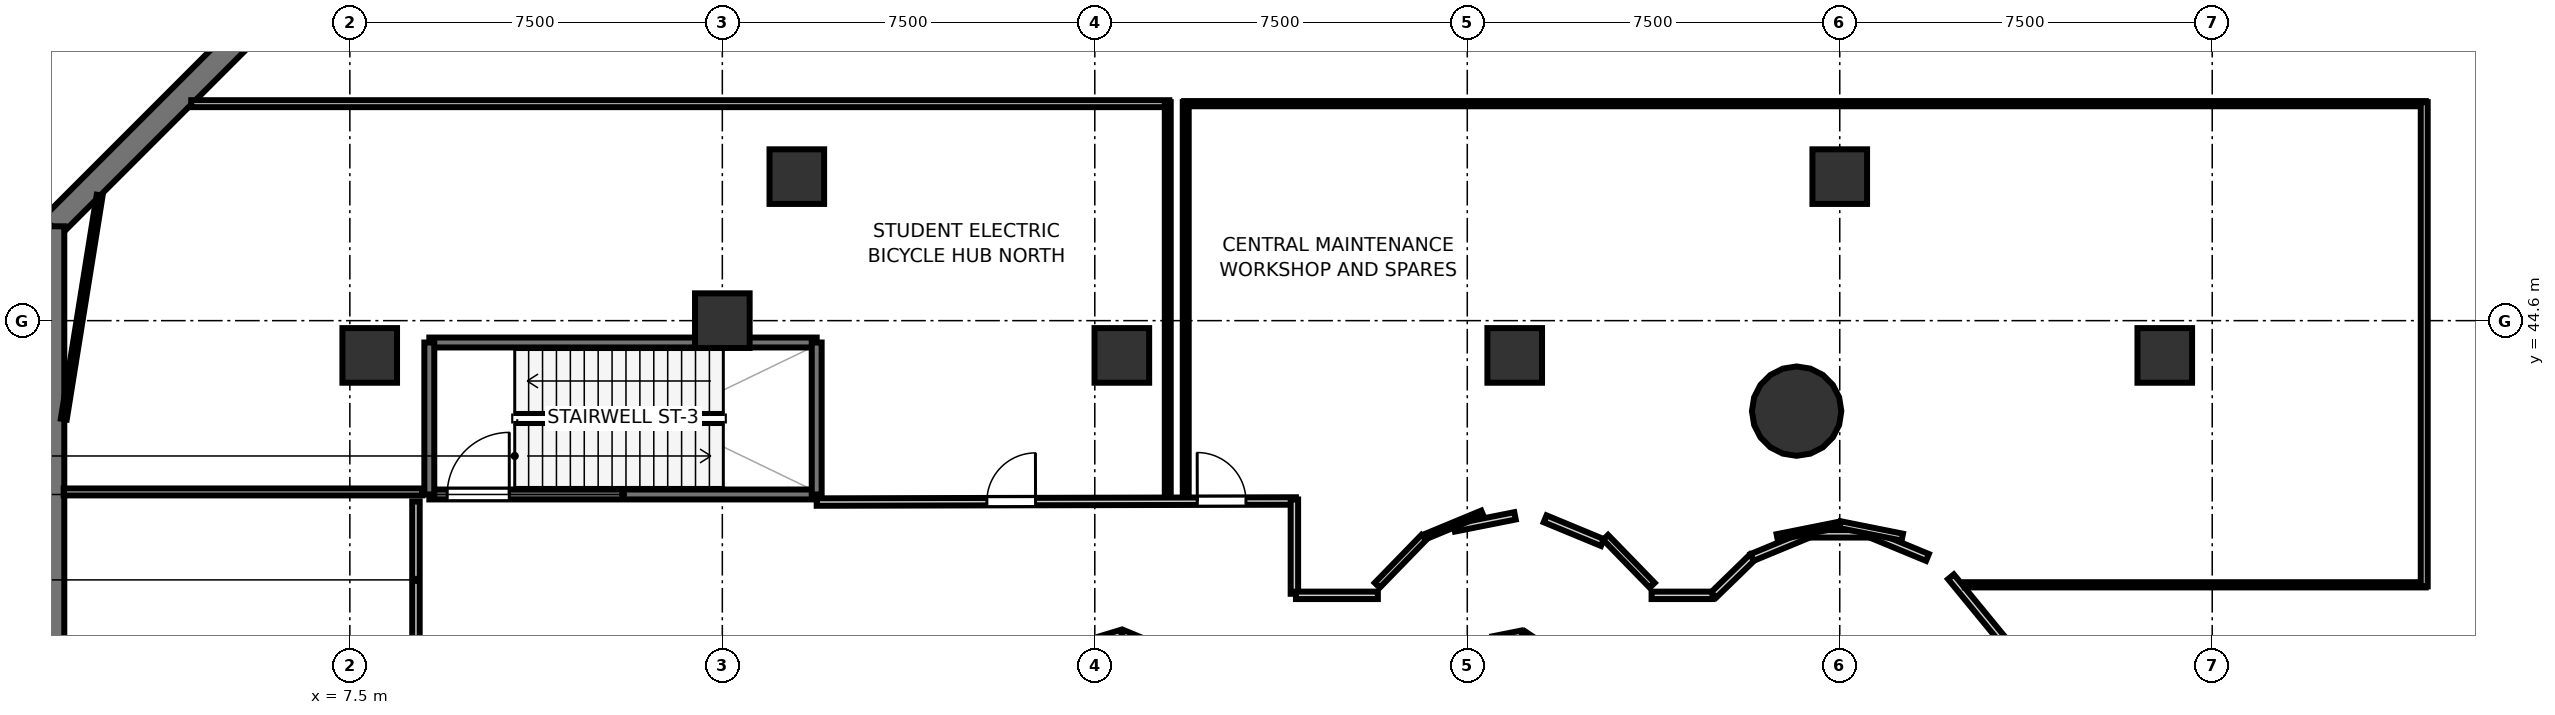
"""IFC4 building model, lengths in metres.
Left out: names, types, materials, properties, quantities, classifications, styles, units other than length and angle.
Written with IfcOpenShell. Run it as: python <this file> out.ifc"""

import sys

from ifc_helpers import new_model, si_unit, direction, frame, frame_2d, origin, origin_2d, place, context, subcontext, project, spatial, rectangle, hollow_circle, extrude, element, fill, save


model = new_model("IFC4")
c1 = context("Model", 3, precision=1e-05, world=origin(), true_north=direction((0.0, 1.0)))
c2 = subcontext(c1, "Body", "Model", "MODEL_VIEW")
j1 = project(units=[si_unit("LENGTHUNIT", "METRE"), si_unit("PLANEANGLEUNIT", "RADIAN")], contexts=[c1])
p1 = place(None, origin())
s1 = spatial("IfcSite", under=j1, at=p1, CompositionType="ELEMENT")
p2 = place(p1, origin())
s2 = spatial("IfcBuilding", under=s1, at=p2, CompositionType="ELEMENT")
p3 = place(p2, frame((0.0, 0.0, -5.6)))
s3 = spatial("IfcBuildingStorey", under=s2, at=p3, CompositionType="ELEMENT", Elevation=-5.6)
p4 = place(p3, frame((36.632, 42.778, 0.0), z_axis=(0.0, 0.0, 1.0), x_axis=(1.0, 0.0, 0.0)))
e1 = element("IfcColumn", 1, at=p4, inside=s3, PredefinedType="COLUMN", context=c2, shape_type="SweptSolid", body=[
    extrude(hollow_circle(Radius=0.9, WallThickness=0.045, at=origin_2d()), origin(), (0.0, 0.0, 1.0), 5.6),
])
for number, where, z_axis, x_axis in (
    (2, (7.9, 43.9, 0.0), (0.0, 0.0, 1.0), (1.0, 0.0, 0.0)),
    (3, (23.045, 43.9, 0.0), (0.0, 0.0, 1.0), (1.0, 0.0, 0.0)),
    (4, (30.955, 43.9, 0.0), (0.0, 0.0, 1.0), (1.0, 0.0, 0.0)),
    (5, (44.045, 43.9, 0.0), (0.0, 0.0, 1.0), (1.0, 0.0, 0.0)),
    (6, (15.0, 44.6, 0.0), (0.0, 0.0, 1.0), (1.0, 0.0, 0.0)),
    (7, (16.5, 47.5, 0.0), (0.0, 0.0, 1.0), (1.0, 0.0, 0.0)),
    (8, (37.5, 47.5, 0.0), (0.0, 0.0, 1.0), (1.0, 0.0, 0.0)),
):
    element("IfcColumn", number, at=place(p3, frame(where, z_axis=z_axis, x_axis=x_axis)), inside=s3, PredefinedType="COLUMN", context=c2, shape_type="SweptSolid", body=[
        extrude(rectangle(XDim=1.1, YDim=1.1, at=origin_2d()), origin(), (0.0, 0.0, 1.0), 5.6),
    ])
p5 = place(p3, frame((5.5, 50.5, 0.0), z_axis=(0.0, 0.0, 1.0), x_axis=(-0.707106781187, -0.707106781187, 0.0)))
e9 = element("IfcWall", 9, at=p5, inside=s3, PredefinedType="SOLIDWALL", context=c2, shape_type="SweptSolid", body=[
    extrude(rectangle(XDim=5.657, YDim=0.5, at=frame_2d((2.828, 0.0))), origin(), (0.0, 0.0, 1.0), 5.3),
])
p6 = place(p3, frame((1.5, 46.5, 0.0), z_axis=(0.0, 0.0, 1.0), x_axis=(0.0, -1.0, 0.0)))
e10 = element("IfcWall", 10, at=p6, inside=s3, PredefinedType="SOLIDWALL", context=c2, shape_type="SweptSolid", body=[
    extrude(rectangle(XDim=41.0, YDim=0.5, at=frame_2d((20.5, 0.0))), origin(), (0.0, 0.0, 1.0), 5.3),
])
p7 = place(p3, frame((9.1, 41.1, 0.0), z_axis=(0.0, 0.0, 1.0), x_axis=(1.0, 0.0, 0.0)))
e11 = element("IfcWall", 11, at=p7, inside=s3, PredefinedType="SOLIDWALL", context=c2, shape_type="SweptSolid", body=[
    extrude(rectangle(XDim=7.8, YDim=0.2, at=frame_2d((3.9, 0.0))), origin(), (0.0, 0.0, 1.0), 5.3),
])
p8 = place(p7, frame((0.36, 0.0, 0.0)))
e12 = element("IfcOpeningElement", 12, at=p8, cuts=e11, PredefinedType="OPENING", context=c2, shape_type="SweptSolid", body=[
    extrude(rectangle(XDim=1.25, YDim=2.15, at=frame_2d((0.625, 1.075))), frame((0.0, 0.11, 0.0), z_axis=(0.0, -1.0, 0.0), x_axis=(1.0, 0.0, 0.0)), (0.0, 0.0, 1.0), 0.22),
])
p9 = place(p3, frame((9.1, 44.16, 0.0), z_axis=(0.0, 0.0, 1.0), x_axis=(1.0, 0.0, 0.0)))
e13 = element("IfcWall", 13, at=p9, inside=s3, PredefinedType="SOLIDWALL", context=c2, shape_type="SweptSolid", body=[
    extrude(rectangle(XDim=7.8, YDim=0.2, at=frame_2d((3.9, 0.0))), origin(), (0.0, 0.0, 1.0), 5.3),
])
for number, where, z_axis, x_axis in (
    (14, (9.1, 41.1, 0.0), (0.0, 0.0, 1.0), (0.0, 1.0, 0.0)),
    (15, (16.9, 41.1, 0.0), (0.0, 0.0, 1.0), (0.0, 1.0, 0.0)),
):
    element("IfcWall", number, at=place(p3, frame(where, z_axis=z_axis, x_axis=x_axis)), inside=s3, PredefinedType="SOLIDWALL", context=c2, shape_type="SweptSolid", body=[
        extrude(rectangle(XDim=3.06, YDim=0.2, at=frame_2d((1.53, 0.0))), origin(), (0.0, 0.0, 1.0), 5.3),
    ])
p10 = place(p3, frame((8.831, 37.8, 0.0), z_axis=(0.0, 0.0, 1.0), x_axis=(0.0, 1.0, 0.0)))
e16 = element("IfcWall", 16, at=p10, inside=s3, PredefinedType="PARTITIONING", context=c2, shape_type="SweptSolid", body=[
    extrude(rectangle(XDim=3.16, YDim=0.15, at=frame_2d((1.58, 0.0))), origin(), (0.0, 0.0, 1.0), 4.62),
])
p11 = place(p3, frame((16.9, 40.947, 0.0), z_axis=(0.0, 0.0, 1.0), x_axis=(0.999997465101, 0.002251619764, 0.0)))
e17 = element("IfcWall", 17, at=p11, inside=s3, PredefinedType="PARTITIONING", context=c2, shape_type="SweptSolid", body=[
    extrude(rectangle(XDim=9.65, YDim=0.15, at=frame_2d((4.825, 0.0))), origin(), (0.0, 0.0, 1.0), 4.62),
])
p12 = place(p11, frame((3.427, 0.0, 0.0)))
e18 = element("IfcOpeningElement", 18, at=p12, cuts=e17, PredefinedType="OPENING", context=c2, shape_type="SweptSolid", body=[
    extrude(rectangle(XDim=0.98, YDim=2.1, at=frame_2d((0.49, 1.05))), frame((0.0, 0.085, 0.0), z_axis=(0.0, -1.0, 0.0), x_axis=(1.0, 0.0, 0.0)), (0.0, 0.0, 1.0), 0.17),
])
p13 = place(p11, frame((7.664, 0.0, 0.0)))
e19 = element("IfcOpeningElement", 19, at=p13, cuts=e17, PredefinedType="OPENING", context=c2, shape_type="SweptSolid", body=[
    extrude(rectangle(XDim=0.98, YDim=2.1, at=frame_2d((0.49, 1.05))), frame((0.0, 0.085, 0.0), z_axis=(0.0, -1.0, 0.0), x_axis=(1.0, 0.0, 0.0)), (0.0, 0.0, 1.0), 0.17),
])
p14 = place(p3, frame((26.519, 41.0, 0.0), z_axis=(0.0, 0.0, 1.0), x_axis=(0.0, -1.0, 0.0)))
e20 = element("IfcWall", 20, at=p14, inside=s3, PredefinedType="PARTITIONING", context=c2, shape_type="SweptSolid", body=[
    extrude(rectangle(XDim=1.9, YDim=0.15, at=frame_2d((0.95, 0.0))), origin(), (0.0, 0.0, 1.0), 4.62),
])
p15 = place(p3, frame((26.55, 39.069, 0.0), z_axis=(0.0, 0.0, 1.0), x_axis=(1.0, 0.0, 0.0)))
e21 = element("IfcWall", 21, at=p15, inside=s3, PredefinedType="PARTITIONING", context=c2, shape_type="SweptSolid", body=[
    extrude(rectangle(XDim=1.65, YDim=0.15, at=frame_2d((0.825, 0.0))), origin(), (0.0, 0.0, 1.0), 4.62),
])
for number, where, z_axis, x_axis in (
    (22, (29.737, 40.426, 0.0), (0.0, 0.0, 1.0), (0.981, 0.195, 0.0)),
    (23, (31.568, 40.61, 0.0), (0.0, 0.0, 1.0), (0.924, -0.383, 0.0)),
):
    element("IfcWall", number, at=place(p3, frame(where, z_axis=z_axis, x_axis=x_axis)), inside=s3, PredefinedType="PARTITIONING", context=c2, shape_type="SweptSolid", body=[
        extrude(rectangle(XDim=1.249, YDim=0.15, at=frame_2d((0.624, 0.0))), origin(), (0.0, 0.0, 1.0), 4.62),
    ])
p16 = place(p3, frame((33.711, 39.069, 0.0), z_axis=(0.0, 0.0, 1.0), x_axis=(1.0, 0.0, 0.0)))
e24 = element("IfcWall", 24, at=p16, inside=s3, PredefinedType="PARTITIONING", context=c2, shape_type="SweptSolid", body=[
    extrude(rectangle(XDim=1.229, YDim=0.15, at=frame_2d((0.614, 0.0))), origin(), (0.0, 0.0, 1.0), 4.62),
])
p17 = place(p3, frame((34.961, 39.078, 0.0), z_axis=(0.0, 0.0, 1.0), x_axis=(0.717212292906, 0.69685473874, 0.0)))
e25 = element("IfcWall", 25, at=p17, inside=s3, PredefinedType="PARTITIONING", context=c2, shape_type="SweptSolid", body=[
    extrude(rectangle(XDim=1.091, YDim=0.15, at=frame_2d((0.546, 0.0))), origin(), (0.0, 0.0, 1.0), 4.62),
])
p18 = place(p3, frame((35.734, 39.832, 0.0), z_axis=(0.0, 0.0, 1.0), x_axis=(0.92391915299, 0.38258776606, 0.0)))
e26 = element("IfcWall", 26, at=p18, inside=s3, PredefinedType="PARTITIONING", context=c2, shape_type="SweptSolid", body=[
    extrude(rectangle(XDim=1.249, YDim=0.15, at=frame_2d((0.625, 0.0))), origin(), (0.0, 0.0, 1.0), 4.62),
])
p19 = place(p3, frame((36.876, 40.308, 0.0), z_axis=(0.0, 0.0, 1.0), x_axis=(1.0, 0.0, 0.0)))
e27 = element("IfcWall", 27, at=p19, inside=s3, PredefinedType="PARTITIONING", context=c2, shape_type="SweptSolid", body=[
    extrude(rectangle(XDim=1.249, YDim=0.15, at=frame_2d((0.624, 0.0))), origin(), (0.0, 0.0, 1.0), 4.62),
])
p20 = place(p3, frame((38.112, 40.31, 0.0), z_axis=(0.0, 0.0, 1.0), x_axis=(0.92391915299, -0.38258776606, 0.0)))
e28 = element("IfcWall", 28, at=p20, inside=s3, PredefinedType="PARTITIONING", context=c2, shape_type="SweptSolid", body=[
    extrude(rectangle(XDim=1.249, YDim=0.15, at=frame_2d((0.625, 0.0))), origin(), (0.0, 0.0, 1.0), 4.62),
])
p21 = place(p3, frame((39.739, 39.443, 0.0), z_axis=(0.0, 0.0, 1.0), x_axis=(0.634417418508, -0.772990646188, 0.0)))
e29 = element("IfcWall", 29, at=p21, inside=s3, PredefinedType="PARTITIONING", context=c2, shape_type="SweptSolid", body=[
    extrude(rectangle(XDim=2.895, YDim=0.15, at=frame_2d((1.447, 0.0))), origin(), (0.0, 0.0, 1.0), 4.62),
])
for number, where, z_axis, x_axis in (
    (30, (31.613, 37.954, 0.0), (0.0, 0.0, 1.0), (-0.831, 0.556, 0.0)),
    (31, (31.1, 38.286, 0.0), (0.0, 0.0, 1.0), (-0.981, -0.195, 0.0)),
    (32, (23.601, 38.073, 0.0), (0.0, 0.0, 1.0), (-0.924, 0.383, 0.0)),
):
    element("IfcWall", number, at=place(p3, frame(where, z_axis=z_axis, x_axis=x_axis)), inside=s3, PredefinedType="PARTITIONING", context=c2, shape_type="SweptSolid", body=[
        extrude(rectangle(XDim=0.589, YDim=0.15, at=frame_2d((0.295, 0.0))), origin(), (0.0, 0.0, 1.0), 4.62),
    ])
p22 = place(p3, frame((23.036, 38.3, 0.0), z_axis=(0.0, 0.0, 1.0), x_axis=(-0.956858887343, -0.290553041134, 0.0)))
e33 = element("IfcWall", 33, at=p22, inside=s3, PredefinedType="PARTITIONING", context=c2, shape_type="SweptSolid", body=[
    extrude(rectangle(XDim=0.447, YDim=0.15, at=frame_2d((0.224, 0.0))), origin(), (0.0, 0.0, 1.0), 4.62),
])
p23 = place(p3, frame((8.96, 41.151, 0.0), z_axis=(0.0, 0.0, 1.0), x_axis=(-1.0, 0.0, 0.0)))
e34 = element("IfcWall", 34, at=p23, inside=s3, PredefinedType="PARTITIONING", context=c2, shape_type="SweptSolid", body=[
    extrude(rectangle(XDim=7.222, YDim=0.14, at=frame_2d((3.611, 0.0))), origin(), (0.0, 0.0, 1.0), 4.62),
])
p24 = place(p3, frame((1.74, 42.617, 0.0), z_axis=(0.0, 0.0, 1.0), x_axis=(0.158292817812, 0.987392213778, 0.0)))
e35 = element("IfcWall", 35, at=p24, inside=s3, PredefinedType="PARTITIONING", context=c2, shape_type="SweptSolid", body=[
    extrude(rectangle(XDim=4.567, YDim=0.12, at=frame_2d((2.283, 0.0))), origin(), (0.0, 0.0, 1.0), 4.62),
])
p25 = place(p3, frame((4.306, 48.969, 0.0), z_axis=(0.0, 0.0, 1.0), x_axis=(1.0, 0.0, 0.0)))
e36 = element("IfcWall", 36, at=p25, inside=s3, PredefinedType="PARTITIONING", context=c2, shape_type="SweptSolid", body=[
    extrude(rectangle(XDim=19.694, YDim=0.14, at=frame_2d((9.847, 0.0))), origin(), (0.0, 0.0, 1.0), 4.62),
])
p26 = place(p3, frame((23.969, 49.0, 0.0), z_axis=(0.0, 0.0, 1.0), x_axis=(0.0, -1.0, 0.0)))
e37 = element("IfcWall", 37, at=p26, inside=s3, PredefinedType="PARTITIONING", context=c2, shape_type="SweptSolid", body=[
    extrude(rectangle(XDim=7.88, YDim=0.12, at=frame_2d((3.94, 0.0))), origin(), (0.0, 0.0, 1.0), 4.62),
])
p27 = place(p3, frame((49.3, 39.281, 0.0), z_axis=(0.0, 0.0, 1.0), x_axis=(-1.0, 0.0, 0.0)))
e38 = element("IfcWall", 38, at=p27, inside=s3, PredefinedType="PARTITIONING", context=c2, shape_type="SweptSolid", body=[
    extrude(rectangle(XDim=9.282, YDim=0.105, at=frame_2d((4.641, 0.0))), origin(), (0.0, 0.0, 1.0), 4.62),
])
p28 = place(p3, frame((38.76, 40.241, 0.0), z_axis=(0.0, 0.0, 1.0), x_axis=(-0.9805512928, 0.196262992406, 0.0)))
e39 = element("IfcWall", 39, at=p28, inside=s3, PredefinedType="PARTITIONING", context=c2, shape_type="SweptSolid", body=[
    extrude(rectangle(XDim=1.279, YDim=0.14, at=frame_2d((0.639, 0.0))), origin(), (0.0, 0.0, 1.0), 4.62),
])
p29 = place(p3, frame((37.494, 40.492, 0.0), z_axis=(0.0, 0.0, 1.0), x_axis=(-0.9805512928, -0.196262992406, 0.0)))
e40 = element("IfcWall", 40, at=p29, inside=s3, PredefinedType="PARTITIONING", context=c2, shape_type="SweptSolid", body=[
    extrude(rectangle(XDim=1.279, YDim=0.12, at=frame_2d((0.639, 0.0))), origin(), (0.0, 0.0, 1.0), 4.62),
])
p30 = place(p3, frame((33.723, 39.271, 0.0), z_axis=(0.0, 0.0, 1.0), x_axis=(-0.697065448929, 0.717007503385, 0.0)))
e41 = element("IfcWall", 41, at=p30, inside=s3, PredefinedType="PARTITIONING", context=c2, shape_type="SweptSolid", body=[
    extrude(rectangle(XDim=1.347, YDim=0.14, at=frame_2d((0.673, 0.0))), origin(), (0.0, 0.0, 1.0), 4.62),
])
p31 = place(p3, frame((30.301, 40.727, 0.0), z_axis=(0.0, 0.0, 1.0), x_axis=(-0.923825639064, -0.382813516753, 0.0)))
e42 = element("IfcWall", 42, at=p31, inside=s3, PredefinedType="PARTITIONING", context=c2, shape_type="SweptSolid", body=[
    extrude(rectangle(XDim=1.261, YDim=0.105, at=frame_2d((0.63, 0.0))), origin(), (0.0, 0.0, 1.0), 4.62),
])
p32 = place(p3, frame((29.126, 40.237, 0.0), z_axis=(0.0, 0.0, 1.0), x_axis=(-0.697158633131, -0.716916899125, 0.0)))
e43 = element("IfcWall", 43, at=p32, inside=s3, PredefinedType="PARTITIONING", context=c2, shape_type="SweptSolid", body=[
    extrude(rectangle(XDim=1.347, YDim=0.14, at=frame_2d((0.673, 0.0))), origin(), (0.0, 0.0, 1.0), 4.62),
])
p33 = place(p3, frame((24.331, 41.062, 0.0), z_axis=(0.0, 0.0, 1.0), x_axis=(0.0, 1.0, 0.0)))
e44 = element("IfcWall", 44, at=p33, inside=s3, PredefinedType="PARTITIONING", context=c2, shape_type="SweptSolid", body=[
    extrude(rectangle(XDim=7.938, YDim=0.12, at=frame_2d((3.969, 0.0))), origin(), (0.0, 0.0, 1.0), 4.62),
])
p34 = place(p3, frame((24.3, 48.969, 0.0), z_axis=(0.0, 0.0, 1.0), x_axis=(1.0, 0.0, 0.0)))
e45 = element("IfcWall", 45, at=p34, inside=s3, PredefinedType="PARTITIONING", context=c2, shape_type="SweptSolid", body=[
    extrude(rectangle(XDim=25.0, YDim=0.105, at=frame_2d((12.5, 0.0))), origin(), (0.0, 0.0, 1.0), 4.62),
])
p35 = place(p3, frame((49.269, 49.0, 0.0), z_axis=(0.0, 0.0, 1.0), x_axis=(0.0, -1.0, 0.0)))
e46 = element("IfcWall", 46, at=p35, inside=s3, PredefinedType="PARTITIONING", context=c2, shape_type="SweptSolid", body=[
    extrude(rectangle(XDim=9.75, YDim=0.14, at=frame_2d((4.875, 0.0))), origin(), (0.0, 0.0, 1.0), 4.62),
])
p36 = place(p8, origin())
e47 = element("IfcDoor", 47, at=p36, inside=s3, OperationType="SINGLE_SWING_RIGHT", PredefinedType="DOOR", context=c2, shape_type="SweptSolid", body=[
    extrude(rectangle(XDim=1.25, YDim=2.15, at=frame_2d((0.625, 1.075))), frame((0.0, 0.025, 0.0), z_axis=(0.0, -1.0, 0.0), x_axis=(1.0, 0.0, 0.0)), (0.0, 0.0, 1.0), 0.05),
])
fill(e12, e47)
p37 = place(p12, origin())
e48 = element("IfcDoor", 48, at=p37, inside=s3, OperationType="SINGLE_SWING_RIGHT", PredefinedType="DOOR", context=c2, shape_type="SweptSolid", body=[
    extrude(rectangle(XDim=0.98, YDim=2.1, at=frame_2d((0.49, 1.05))), frame((0.0, 0.025, 0.0), z_axis=(0.0, -1.0, 0.0), x_axis=(1.0, 0.0, 0.0)), (0.0, 0.0, 1.0), 0.05),
])
fill(e18, e48)
p38 = place(p13, origin())
e49 = element("IfcDoor", 49, at=p38, inside=s3, OperationType="SINGLE_SWING_LEFT", PredefinedType="DOOR", context=c2, shape_type="SweptSolid", body=[
    extrude(rectangle(XDim=0.98, YDim=2.1, at=frame_2d((0.49, 1.05))), frame((0.0, 0.025, 0.0), z_axis=(0.0, -1.0, 0.0), x_axis=(1.0, 0.0, 0.0)), (0.0, 0.0, 1.0), 0.05),
])
fill(e19, e49)
save(model, sys.argv[1])
